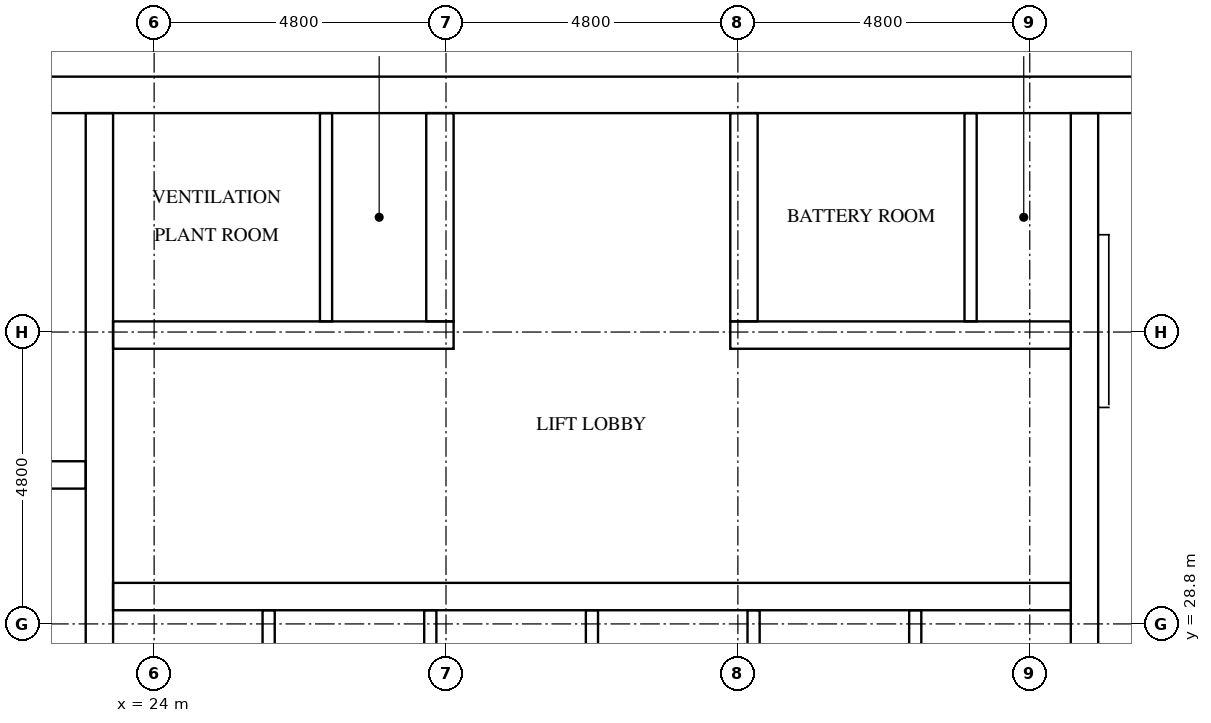
"""IFC4 building model, lengths in metres.
Left out: names, types, materials, properties, quantities, classifications, styles, units other than length and angle.
Written with IfcOpenShell. Run it as: python <this file> out.ifc"""

import sys

from ifc_helpers import new_model, si_unit, direction, frame, frame_2d, origin, place, context, subcontext, project, spatial, rectangle, extrude, element, fill, save


model = new_model("IFC4")
c1 = context("Model", 3, precision=1e-05, world=origin(), true_north=direction((0.0, 1.0)))
c2 = subcontext(c1, "Body", "Model", "MODEL_VIEW")
j1 = project(units=[si_unit("LENGTHUNIT", "METRE"), si_unit("PLANEANGLEUNIT", "RADIAN")], contexts=[c1])
p1 = place(None, origin())
s1 = spatial("IfcSite", under=j1, at=p1, CompositionType="ELEMENT")
p2 = place(p1, origin())
s2 = spatial("IfcBuilding", under=s1, at=p2, CompositionType="ELEMENT")
p3 = place(p2, frame((0.0, 0.0, 238.7)))
s3 = spatial("IfcBuildingStorey", under=s2, at=p3, CompositionType="ELEMENT", Elevation=238.7)
p4 = place(p3, frame((15.0, 37.5, 0.0), z_axis=(0.0, 0.0, 1.0), x_axis=(1.0, 0.0, 0.0)))
e1 = element("IfcWall", 1, at=p4, inside=s3, PredefinedType="SHEAR", context=c2, shape_type="SweptSolid", body=[
    extrude(rectangle(XDim=32.4, YDim=0.6, at=frame_2d((16.2, 0.0))), origin(), (0.0, 0.0, 1.0), 3.2),
])
p5 = place(p4, frame((15.3, 0.0, 0.0)))
e2 = element("IfcOpeningElement", 2, at=p5, cuts=e1, PredefinedType="OPENING", context=c2, shape_type="SweptSolid", body=[
    extrude(rectangle(XDim=1.8, YDim=2.1, at=frame_2d((0.9, 1.05))), frame((0.0, 0.31, 0.0), z_axis=(0.0, -1.0, 0.0), x_axis=(1.0, 0.0, 0.0)), (0.0, 0.0, 1.0), 0.62),
])
p6 = place(p4, frame((1.25, 0.0, 0.0)))
e3 = element("IfcOpeningElement", 3, at=p6, cuts=e1, PredefinedType="OPENING", context=c2, shape_type="SweptSolid", body=[
    extrude(rectangle(XDim=1.0, YDim=2.1, at=frame_2d((0.5, 1.05))), frame((0.0, 0.31, 0.0), z_axis=(0.0, -1.0, 0.0), x_axis=(1.0, 0.0, 0.0)), (0.0, 0.0, 1.0), 0.62),
])
p7 = place(p4, frame((4.988, 0.0, 0.0)))
e4 = element("IfcOpeningElement", 4, at=p7, cuts=e1, PredefinedType="OPENING", context=c2, shape_type="SweptSolid", body=[
    extrude(rectangle(XDim=1.0, YDim=2.1, at=frame_2d((0.5, 1.05))), frame((0.0, 0.31, 0.0), z_axis=(0.0, -1.0, 0.0), x_axis=(1.0, 0.0, 0.0)), (0.0, 0.0, 1.0), 0.62),
])
p8 = place(p3, frame((23.1, 15.6, 0.0), z_axis=(0.0, 0.0, 1.0), x_axis=(0.0, 1.0, 0.0)))
e5 = element("IfcWall", 5, at=p8, inside=s3, PredefinedType="SHEAR", context=c2, shape_type="SweptSolid", body=[
    extrude(rectangle(XDim=21.6, YDim=0.45, at=frame_2d((10.8, 0.0))), origin(), (0.0, 0.0, 1.0), 3.2),
])
p9 = place(p3, frame((39.3, 27.75, 0.0), z_axis=(0.0, 0.0, 1.0), x_axis=(0.0, 1.0, 0.0)))
e6 = element("IfcWall", 6, at=p9, inside=s3, PredefinedType="SHEAR", context=c2, shape_type="SweptSolid", body=[
    extrude(rectangle(XDim=9.45, YDim=0.45, at=frame_2d((4.725, 0.0))), origin(), (0.0, 0.0, 1.0), 3.2),
])
p10 = place(p3, frame((15.6, 31.25, 0.0), z_axis=(0.0, 0.0, 1.0), x_axis=(1.0, 0.0, 0.0)))
e7 = element("IfcWall", 7, at=p10, inside=s3, PredefinedType="SHEAR", context=c2, shape_type="SweptSolid", body=[
    extrude(rectangle(XDim=7.275, YDim=0.45, at=frame_2d((3.637, 0.0))), origin(), (0.0, 0.0, 1.0), 3.2),
])
p11 = place(p3, frame((23.325, 29.25, 0.0), z_axis=(0.0, 0.0, 1.0), x_axis=(1.0, 0.0, 0.0)))
e8 = element("IfcWall", 8, at=p11, inside=s3, PredefinedType="SHEAR", context=c2, shape_type="SweptSolid", body=[
    extrude(rectangle(XDim=15.75, YDim=0.45, at=frame_2d((7.875, 0.0))), origin(), (0.0, 0.0, 1.0), 3.2),
])
p12 = place(p11, frame((0.679, 0.0, 0.0)))
e9 = element("IfcOpeningElement", 9, at=p12, cuts=e8, PredefinedType="OPENING", context=c2, shape_type="SweptSolid", body=[
    extrude(rectangle(XDim=1.1, YDim=2.1, at=frame_2d((0.55, 1.05))), frame((0.0, 0.235, 0.0), z_axis=(0.0, -1.0, 0.0), x_axis=(1.0, 0.0, 0.0)), (0.0, 0.0, 1.0), 0.47),
])
p13 = place(p11, frame((3.337, 0.0, 0.0)))
e10 = element("IfcOpeningElement", 10, at=p13, cuts=e8, PredefinedType="OPENING", context=c2, shape_type="SweptSolid", body=[
    extrude(rectangle(XDim=1.1, YDim=2.1, at=frame_2d((0.55, 1.05))), frame((0.0, 0.235, 0.0), z_axis=(0.0, -1.0, 0.0), x_axis=(1.0, 0.0, 0.0)), (0.0, 0.0, 1.0), 0.47),
])
p14 = place(p11, frame((5.996, 0.0, 0.0)))
e11 = element("IfcOpeningElement", 11, at=p14, cuts=e8, PredefinedType="OPENING", context=c2, shape_type="SweptSolid", body=[
    extrude(rectangle(XDim=1.1, YDim=2.1, at=frame_2d((0.55, 1.05))), frame((0.0, 0.235, 0.0), z_axis=(0.0, -1.0, 0.0), x_axis=(1.0, 0.0, 0.0)), (0.0, 0.0, 1.0), 0.47),
])
p15 = place(p11, frame((8.654, 0.0, 0.0)))
e12 = element("IfcOpeningElement", 12, at=p15, cuts=e8, PredefinedType="OPENING", context=c2, shape_type="SweptSolid", body=[
    extrude(rectangle(XDim=1.1, YDim=2.1, at=frame_2d((0.55, 1.05))), frame((0.0, 0.235, 0.0), z_axis=(0.0, -1.0, 0.0), x_axis=(1.0, 0.0, 0.0)), (0.0, 0.0, 1.0), 0.47),
])
p16 = place(p11, frame((11.312, 0.0, 0.0)))
e13 = element("IfcOpeningElement", 13, at=p16, cuts=e8, PredefinedType="OPENING", context=c2, shape_type="SweptSolid", body=[
    extrude(rectangle(XDim=1.1, YDim=2.1, at=frame_2d((0.55, 1.05))), frame((0.0, 0.235, 0.0), z_axis=(0.0, -1.0, 0.0), x_axis=(1.0, 0.0, 0.0)), (0.0, 0.0, 1.0), 0.47),
])
p17 = place(p11, frame((13.971, 0.0, 0.0)))
e14 = element("IfcOpeningElement", 14, at=p17, cuts=e8, PredefinedType="OPENING", context=c2, shape_type="SweptSolid", body=[
    extrude(rectangle(XDim=1.1, YDim=2.1, at=frame_2d((0.55, 1.05))), frame((0.0, 0.235, 0.0), z_axis=(0.0, -1.0, 0.0), x_axis=(1.0, 0.0, 0.0)), (0.0, 0.0, 1.0), 0.47),
])
p18 = place(p3, frame((23.325, 33.55, 0.0), z_axis=(0.0, 0.0, 1.0), x_axis=(1.0, 0.0, 0.0)))
e15 = element("IfcWall", 15, at=p18, inside=s3, PredefinedType="SHEAR", context=c2, shape_type="SweptSolid", body=[
    extrude(rectangle(XDim=5.6, YDim=0.45, at=frame_2d((2.8, 0.0))), origin(), (0.0, 0.0, 1.0), 3.2),
])
p19 = place(p18, frame((1.201, 0.0, 0.0)))
e16 = element("IfcOpeningElement", 16, at=p19, cuts=e15, PredefinedType="OPENING", context=c2, shape_type="SweptSolid", body=[
    extrude(rectangle(XDim=1.0, YDim=2.1, at=frame_2d((0.5, 1.05))), frame((0.0, 0.235, 0.0), z_axis=(0.0, -1.0, 0.0), x_axis=(1.0, 0.0, 0.0)), (0.0, 0.0, 1.0), 0.47),
])
p20 = place(p18, frame((3.876, 0.0, 0.0)))
e17 = element("IfcOpeningElement", 17, at=p20, cuts=e15, PredefinedType="OPENING", context=c2, shape_type="SweptSolid", body=[
    extrude(rectangle(XDim=1.0, YDim=2.1, at=frame_2d((0.5, 1.05))), frame((0.0, 0.235, 0.0), z_axis=(0.0, -1.0, 0.0), x_axis=(1.0, 0.0, 0.0)), (0.0, 0.0, 1.0), 0.47),
])
p21 = place(p3, frame((33.475, 33.55, 0.0), z_axis=(0.0, 0.0, 1.0), x_axis=(1.0, 0.0, 0.0)))
e18 = element("IfcWall", 18, at=p21, inside=s3, PredefinedType="SHEAR", context=c2, shape_type="SweptSolid", body=[
    extrude(rectangle(XDim=5.6, YDim=0.45, at=frame_2d((2.8, 0.0))), origin(), (0.0, 0.0, 1.0), 3.2),
])
p22 = place(p21, frame((1.651, 0.0, 0.0)))
e19 = element("IfcOpeningElement", 19, at=p22, cuts=e18, PredefinedType="OPENING", context=c2, shape_type="SweptSolid", body=[
    extrude(rectangle(XDim=1.0, YDim=2.1, at=frame_2d((0.5, 1.05))), frame((0.0, 0.235, 0.0), z_axis=(0.0, -1.0, 0.0), x_axis=(1.0, 0.0, 0.0)), (0.0, 0.0, 1.0), 0.47),
])
p23 = place(p21, frame((4.326, 0.0, 0.0)))
e20 = element("IfcOpeningElement", 20, at=p23, cuts=e18, PredefinedType="OPENING", context=c2, shape_type="SweptSolid", body=[
    extrude(rectangle(XDim=1.0, YDim=2.1, at=frame_2d((0.5, 1.05))), frame((0.0, 0.235, 0.0), z_axis=(0.0, -1.0, 0.0), x_axis=(1.0, 0.0, 0.0)), (0.0, 0.0, 1.0), 0.47),
])
for number, where, z_axis, x_axis in (
    (21, (28.7, 33.775, 0.0), (0.0, 0.0, 1.0), (0.0, 1.0, 0.0)),
    (22, (33.7, 33.775, 0.0), (0.0, 0.0, 1.0), (0.0, 1.0, 0.0)),
):
    element("IfcWall", number, at=place(p3, frame(where, z_axis=z_axis, x_axis=x_axis)), inside=s3, PredefinedType="SHEAR", context=c2, shape_type="SweptSolid", body=[
        extrude(rectangle(XDim=3.425, YDim=0.45, at=frame_2d((1.712, 0.0))), origin(), (0.0, 0.0, 1.0), 3.2),
    ])
for number, where, z_axis, x_axis in (
    (23, (25.883, 26.375, 0.0), (0.0, 0.0, 1.0), (0.0, 1.0, 0.0)),
    (24, (28.542, 26.375, 0.0), (0.0, 0.0, 1.0), (0.0, 1.0, 0.0)),
    (25, (31.2, 26.375, 0.0), (0.0, 0.0, 1.0), (0.0, 1.0, 0.0)),
    (26, (33.858, 26.375, 0.0), (0.0, 0.0, 1.0), (0.0, 1.0, 0.0)),
    (27, (36.517, 26.375, 0.0), (0.0, 0.0, 1.0), (0.0, 1.0, 0.0)),
):
    element("IfcWall", number, at=place(p3, frame(where, z_axis=z_axis, x_axis=x_axis)), inside=s3, PredefinedType="SOLIDWALL", context=c2, shape_type="SweptSolid", body=[
        extrude(rectangle(XDim=2.65, YDim=0.2, at=frame_2d((1.325, 0.0))), origin(), (0.0, 0.0, 1.0), 3.2),
    ])
for number, where, z_axis, x_axis in (
    (28, (26.827, 33.775, 0.0), (0.0, 0.0, 1.0), (0.0, 1.0, 0.0)),
    (29, (37.427, 33.775, 0.0), (0.0, 0.0, 1.0), (0.0, 1.0, 0.0)),
):
    element("IfcWall", number, at=place(p3, frame(where, z_axis=z_axis, x_axis=x_axis)), inside=s3, PredefinedType="PARTITIONING", context=c2, shape_type="SweptSolid", body=[
        extrude(rectangle(XDim=3.425, YDim=0.2, at=frame_2d((1.712, 0.0))), origin(), (0.0, 0.0, 1.0), 3.2),
    ])
p24 = place(p12, origin())
e30 = element("IfcDoor", 30, at=p24, inside=s3, OperationType="DOUBLE_DOOR_SLIDING", PredefinedType="DOOR", context=c2, shape_type="SweptSolid", body=[
    extrude(rectangle(XDim=1.1, YDim=2.1, at=frame_2d((0.55, 1.05))), frame((0.0, 0.025, 0.0), z_axis=(0.0, -1.0, 0.0), x_axis=(1.0, 0.0, 0.0)), (0.0, 0.0, 1.0), 0.05),
])
fill(e9, e30)
p25 = place(p13, origin())
e31 = element("IfcDoor", 31, at=p25, inside=s3, OperationType="DOUBLE_DOOR_SLIDING", PredefinedType="DOOR", context=c2, shape_type="SweptSolid", body=[
    extrude(rectangle(XDim=1.1, YDim=2.1, at=frame_2d((0.55, 1.05))), frame((0.0, 0.025, 0.0), z_axis=(0.0, -1.0, 0.0), x_axis=(1.0, 0.0, 0.0)), (0.0, 0.0, 1.0), 0.05),
])
fill(e10, e31)
p26 = place(p14, origin())
e32 = element("IfcDoor", 32, at=p26, inside=s3, OperationType="DOUBLE_DOOR_SLIDING", PredefinedType="DOOR", context=c2, shape_type="SweptSolid", body=[
    extrude(rectangle(XDim=1.1, YDim=2.1, at=frame_2d((0.55, 1.05))), frame((0.0, 0.025, 0.0), z_axis=(0.0, -1.0, 0.0), x_axis=(1.0, 0.0, 0.0)), (0.0, 0.0, 1.0), 0.05),
])
fill(e11, e32)
p27 = place(p15, origin())
e33 = element("IfcDoor", 33, at=p27, inside=s3, OperationType="DOUBLE_DOOR_SLIDING", PredefinedType="DOOR", context=c2, shape_type="SweptSolid", body=[
    extrude(rectangle(XDim=1.1, YDim=2.1, at=frame_2d((0.55, 1.05))), frame((0.0, 0.025, 0.0), z_axis=(0.0, -1.0, 0.0), x_axis=(1.0, 0.0, 0.0)), (0.0, 0.0, 1.0), 0.05),
])
fill(e12, e33)
p28 = place(p16, origin())
e34 = element("IfcDoor", 34, at=p28, inside=s3, OperationType="DOUBLE_DOOR_SLIDING", PredefinedType="DOOR", context=c2, shape_type="SweptSolid", body=[
    extrude(rectangle(XDim=1.1, YDim=2.1, at=frame_2d((0.55, 1.05))), frame((0.0, 0.025, 0.0), z_axis=(0.0, -1.0, 0.0), x_axis=(1.0, 0.0, 0.0)), (0.0, 0.0, 1.0), 0.05),
])
fill(e13, e34)
p29 = place(p17, origin())
e35 = element("IfcDoor", 35, at=p29, inside=s3, OperationType="DOUBLE_DOOR_SLIDING", PredefinedType="DOOR", context=c2, shape_type="SweptSolid", body=[
    extrude(rectangle(XDim=1.1, YDim=2.1, at=frame_2d((0.55, 1.05))), frame((0.0, 0.025, 0.0), z_axis=(0.0, -1.0, 0.0), x_axis=(1.0, 0.0, 0.0)), (0.0, 0.0, 1.0), 0.05),
])
fill(e14, e35)
p30 = place(p5, origin())
e36 = element("IfcDoor", 36, at=p30, inside=s3, OperationType="DOUBLE_DOOR_SINGLE_SWING", PredefinedType="DOOR", context=c2, shape_type="SweptSolid", body=[
    extrude(rectangle(XDim=1.8, YDim=2.1, at=frame_2d((0.9, 1.05))), frame((0.0, 0.025, 0.0), z_axis=(0.0, -1.0, 0.0), x_axis=(1.0, 0.0, 0.0)), (0.0, 0.0, 1.0), 0.05),
])
fill(e2, e36)
p31 = place(p19, frame((1.0, 0.0, 0.0), z_axis=(0.0, 0.0, 1.0), x_axis=(-1.0, 0.0, 0.0)))
e37 = element("IfcDoor", 37, at=p31, inside=s3, OperationType="SINGLE_SWING_RIGHT", PredefinedType="DOOR", context=c2, shape_type="SweptSolid", body=[
    extrude(rectangle(XDim=1.0, YDim=2.1, at=frame_2d((0.5, 1.05))), frame((0.0, 0.025, 0.0), z_axis=(0.0, -1.0, 0.0), x_axis=(1.0, 0.0, 0.0)), (0.0, 0.0, 1.0), 0.05),
])
fill(e16, e37)
p32 = place(p20, frame((1.0, 0.0, 0.0), z_axis=(0.0, 0.0, 1.0), x_axis=(-1.0, 0.0, 0.0)))
e38 = element("IfcDoor", 38, at=p32, inside=s3, OperationType="SINGLE_SWING_LEFT", PredefinedType="DOOR", context=c2, shape_type="SweptSolid", body=[
    extrude(rectangle(XDim=1.0, YDim=2.1, at=frame_2d((0.5, 1.05))), frame((0.0, 0.025, 0.0), z_axis=(0.0, -1.0, 0.0), x_axis=(1.0, 0.0, 0.0)), (0.0, 0.0, 1.0), 0.05),
])
fill(e17, e38)
p33 = place(p22, frame((1.0, 0.0, 0.0), z_axis=(0.0, 0.0, 1.0), x_axis=(-1.0, 0.0, 0.0)))
e39 = element("IfcDoor", 39, at=p33, inside=s3, OperationType="SINGLE_SWING_RIGHT", PredefinedType="DOOR", context=c2, shape_type="SweptSolid", body=[
    extrude(rectangle(XDim=1.0, YDim=2.1, at=frame_2d((0.5, 1.05))), frame((0.0, 0.025, 0.0), z_axis=(0.0, -1.0, 0.0), x_axis=(1.0, 0.0, 0.0)), (0.0, 0.0, 1.0), 0.05),
])
fill(e19, e39)
p34 = place(p23, frame((1.0, 0.0, 0.0), z_axis=(0.0, 0.0, 1.0), x_axis=(-1.0, 0.0, 0.0)))
e40 = element("IfcDoor", 40, at=p34, inside=s3, OperationType="SINGLE_SWING_LEFT", PredefinedType="DOOR", context=c2, shape_type="SweptSolid", body=[
    extrude(rectangle(XDim=1.0, YDim=2.1, at=frame_2d((0.5, 1.05))), frame((0.0, 0.025, 0.0), z_axis=(0.0, -1.0, 0.0), x_axis=(1.0, 0.0, 0.0)), (0.0, 0.0, 1.0), 0.05),
])
fill(e20, e40)
save(model, sys.argv[1])
